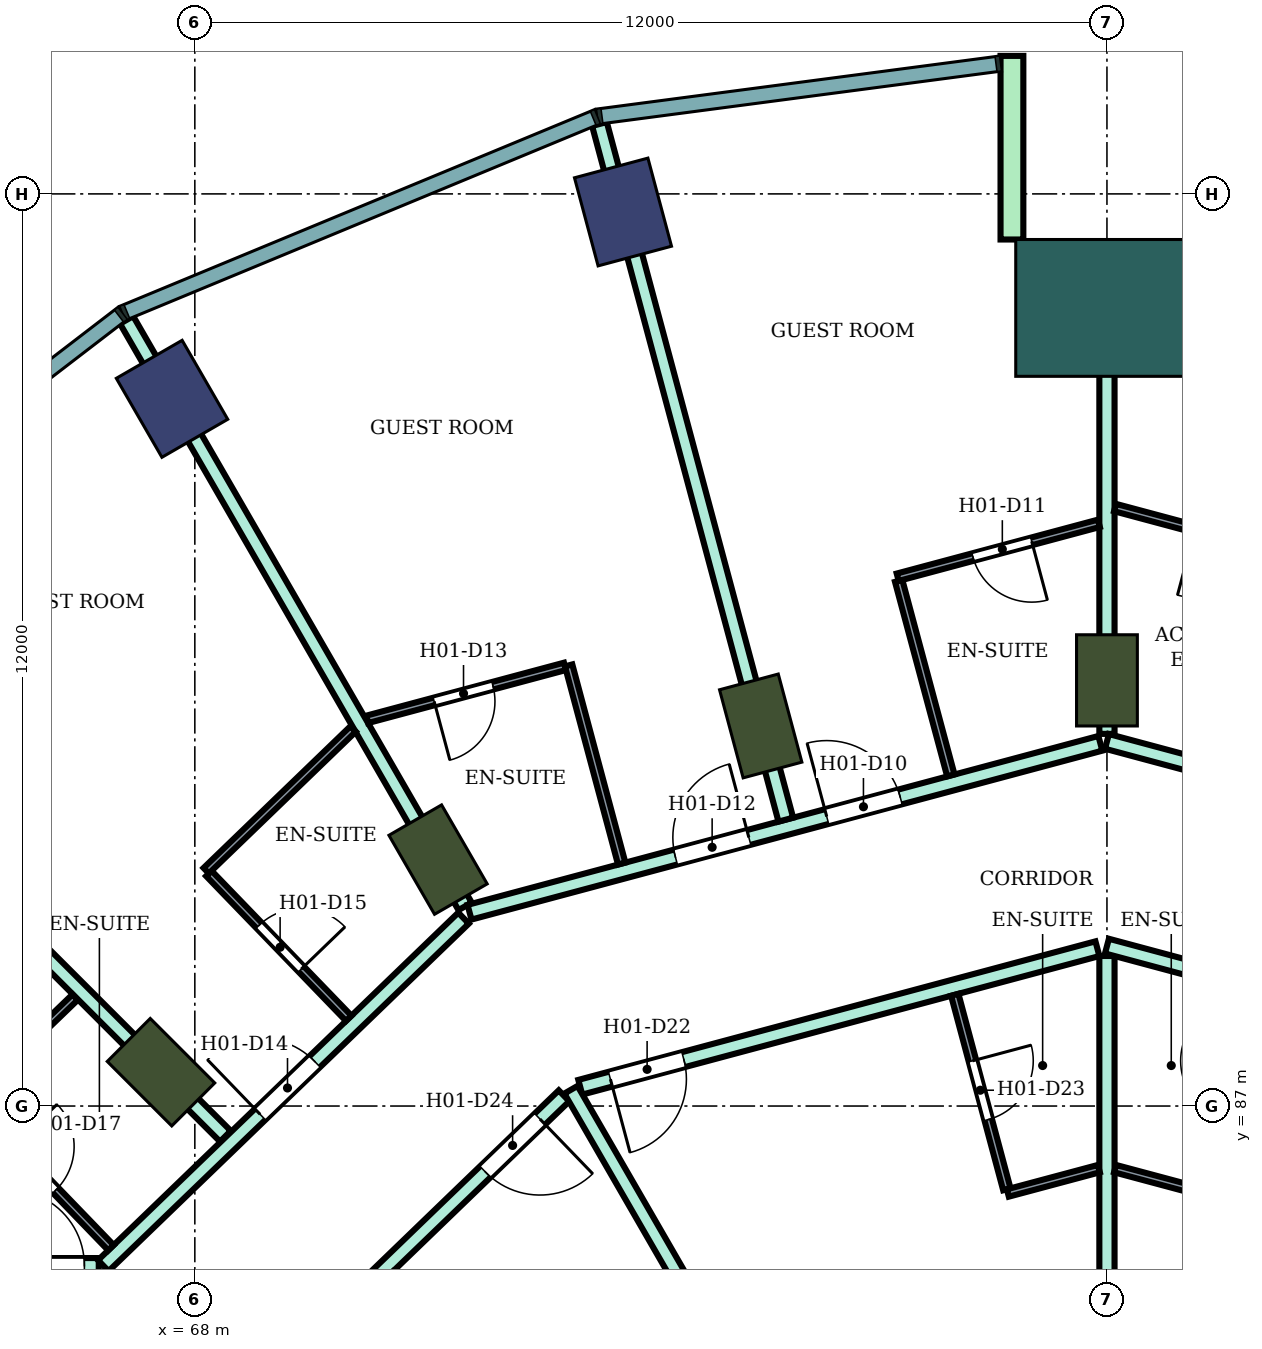
"""IFC4 building model, lengths in metres.
Left out: names, types, materials, properties, quantities, classifications, styles, units other than length and angle.
Written with IfcOpenShell. Run it as: python <this file> out.ifc"""

import sys

from ifc_helpers import new_model, si_unit, direction, frame, frame_2d, origin, origin_2d, place, context, subcontext, project, spatial, rectangle, extrude, element, fill, save


model = new_model("IFC4")
c1 = context("Model", 3, precision=1e-05, world=origin(), true_north=direction((0.0, 1.0)))
c2 = subcontext(c1, "Body", "Model", "MODEL_VIEW")
j1 = project(units=[si_unit("LENGTHUNIT", "METRE"), si_unit("PLANEANGLEUNIT", "RADIAN")], contexts=[c1])
p1 = place(None, origin())
s1 = spatial("IfcSite", under=j1, at=p1, CompositionType="ELEMENT")
p2 = place(p1, origin())
s2 = spatial("IfcBuilding", under=s1, at=p2, CompositionType="ELEMENT")
p3 = place(p2, frame((0.0, 0.0, 32.6)))
s3 = spatial("IfcBuildingStorey", under=s2, at=p3, CompositionType="ELEMENT", Elevation=32.6)
for number, where, z_axis, x_axis in (
    (1, (73.633, 98.762, 0.0), (0.0, 0.0, 1.0), (-0.259, 0.966, 0.0)),
    (2, (67.7, 96.304, 0.0), (0.0, 0.0, 1.0), (-0.5, 0.866, 0.0)),
):
    element("IfcColumn", number, at=place(p3, frame(where, z_axis=z_axis, x_axis=x_axis)), inside=s3, PredefinedType="COLUMN", context=c2, shape_type="SweptSolid", body=[
        extrude(rectangle(XDim=1.2, YDim=1.0, at=origin_2d()), origin(), (0.0, 0.0, 1.0), 3.8),
    ])
for number, where, z_axis, x_axis in (
    (3, (80.0, 92.6, 0.0), (0.0, 0.0, 1.0), (0.0, 1.0, 0.0)),
    (4, (75.445, 92.0, 0.0), (0.0, 0.0, 1.0), (-0.259, 0.966, 0.0)),
    (5, (71.2, 90.242, 0.0), (0.0, 0.0, 1.0), (-0.5, 0.866, 0.0)),
    (6, (67.555, 87.445, 0.0), (0.0, 0.0, 1.0), (-0.707, 0.707, 0.0)),
):
    element("IfcColumn", number, at=place(p3, frame(where, z_axis=z_axis, x_axis=x_axis)), inside=s3, PredefinedType="COLUMN", context=c2, shape_type="SweptSolid", body=[
        extrude(rectangle(XDim=1.2, YDim=0.8, at=origin_2d()), origin(), (0.0, 0.0, 1.0), 3.8),
    ])
p4 = place(p3, frame((80.0, 97.5, 0.0), z_axis=(0.0, 0.0, 1.0), x_axis=(0.0, 1.0, 0.0)))
e7 = element("IfcColumn", 7, at=p4, inside=s3, PredefinedType="COLUMN", context=c2, shape_type="SweptSolid", body=[
    extrude(rectangle(XDim=1.8, YDim=2.4, at=origin_2d()), origin(), (0.0, 0.0, 1.0), 3.8),
])
p5 = place(p3, frame((78.75, 98.4, 0.0), z_axis=(0.0, 0.0, 1.0), x_axis=(0.0, 1.0, 0.0)))
e8 = element("IfcWall", 8, at=p5, inside=s3, PredefinedType="NOTDEFINED", context=c2, shape_type="SweptSolid", body=[
    extrude(rectangle(XDim=2.416, YDim=0.3, at=frame_2d((1.208, 0.0))), origin(), (0.0, 0.0, 1.0), 3.8),
])
p6 = place(p3, frame((63.599, 91.408, 0.0), z_axis=(0.0, 0.0, 1.0), x_axis=(0.706981017422, -0.707232522587, 0.0)))
e9 = element("IfcWall", 9, at=p6, inside=s3, PredefinedType="PARTITIONING", context=c2, shape_type="SweptSolid", body=[
    extrude(rectangle(XDim=6.795, YDim=0.2, at=frame_2d((3.397, 0.0))), origin(), (0.0, 0.0, 1.0), 3.35),
])
p7 = place(p3, frame((65.2, 84.9, 0.0), z_axis=(0.0, 0.0, 1.0), x_axis=(1.0, 0.0, 0.0)))
e10 = element("IfcWall", 10, at=p7, inside=s3, PredefinedType="PARTITIONING", context=c2, shape_type="SweptSolid", body=[
    extrude(rectangle(XDim=1.536, YDim=0.2, at=frame_2d((0.768, 0.0))), origin(), (0.0, 0.0, 1.0), 3.35),
])
p8 = place(p7, frame((0.347, 0.0, 0.0)))
e11 = element("IfcOpeningElement", 11, at=p8, cuts=e10, PredefinedType="OPENING", context=c2, shape_type="SweptSolid", body=[
    extrude(rectangle(XDim=1.0, YDim=2.1, at=frame_2d((0.5, 1.05))), frame((0.0, 0.11, 0.0), z_axis=(0.0, -1.0, 0.0), x_axis=(1.0, 0.0, 0.0)), (0.0, 0.0, 1.0), 0.22),
])
p9 = place(p3, frame((66.796, 84.9, 0.0), z_axis=(0.0, 0.0, 1.0), x_axis=(0.719690131178, 0.694295409092, 0.0)))
e12 = element("IfcWall", 12, at=p9, inside=s3, PredefinedType="PARTITIONING", context=c2, shape_type="SweptSolid", body=[
    extrude(rectangle(XDim=6.585, YDim=0.2, at=frame_2d((3.293, 0.0))), origin(), (0.0, 0.0, 1.0), 3.35),
])
p10 = place(p9, frame((2.867, 0.0, 0.0)))
e13 = element("IfcOpeningElement", 13, at=p10, cuts=e12, PredefinedType="OPENING", context=c2, shape_type="SweptSolid", body=[
    extrude(rectangle(XDim=1.0, YDim=2.1, at=frame_2d((0.5, 1.05))), frame((0.0, 0.11, 0.0), z_axis=(0.0, -1.0, 0.0), x_axis=(1.0, 0.0, 0.0)), (0.0, 0.0, 1.0), 0.22),
])
p11 = place(p3, frame((67.102, 97.342, 0.0), z_axis=(0.0, 0.0, 1.0), x_axis=(0.499944680089, -0.866057340394, 0.0)))
e14 = element("IfcWall", 14, at=p11, inside=s3, PredefinedType="PARTITIONING", context=c2, shape_type="SweptSolid", body=[
    extrude(rectangle(XDim=8.908, YDim=0.2, at=frame_2d((4.454, 0.0))), origin(), (0.0, 0.0, 1.0), 3.35),
])
p12 = place(p3, frame((68.987, 83.4, 0.0), z_axis=(0.0, 0.0, 1.0), x_axis=(0.719591503389, 0.694397629784, 0.0)))
e15 = element("IfcWall", 15, at=p12, inside=s3, PredefinedType="PARTITIONING", context=c2, shape_type="SweptSolid", body=[
    extrude(rectangle(XDim=5.378, YDim=0.2, at=frame_2d((2.689, 0.0))), origin(), (0.0, 0.0, 1.0), 3.35),
])
p13 = place(p12, frame((3.938, 0.0, 0.0)))
e16 = element("IfcOpeningElement", 16, at=p13, cuts=e15, PredefinedType="OPENING", context=c2, shape_type="SweptSolid", body=[
    extrude(rectangle(XDim=1.0, YDim=2.1, at=frame_2d((0.5, 1.05))), frame((0.0, 0.11, 0.0), z_axis=(0.0, -1.0, 0.0), x_axis=(1.0, 0.0, 0.0)), (0.0, 0.0, 1.0), 0.22),
])
p14 = place(p3, frame((71.614, 89.55, 0.0), z_axis=(0.0, 0.0, 1.0), x_axis=(0.965982156828, 0.258608725086, 0.0)))
e17 = element("IfcWall", 17, at=p14, inside=s3, PredefinedType="PARTITIONING", context=c2, shape_type="SweptSolid", body=[
    extrude(rectangle(XDim=8.592, YDim=0.2, at=frame_2d((4.296, 0.0))), origin(), (0.0, 0.0, 1.0), 3.35),
])
p15 = place(p14, frame((4.865, 0.0, 0.0)))
e18 = element("IfcOpeningElement", 18, at=p15, cuts=e17, PredefinedType="OPENING", context=c2, shape_type="SweptSolid", body=[
    extrude(rectangle(XDim=1.0, YDim=2.1, at=frame_2d((0.5, 1.05))), frame((0.0, 0.11, 0.0), z_axis=(0.0, -1.0, 0.0), x_axis=(1.0, 0.0, 0.0)), (0.0, 0.0, 1.0), 0.22),
])
p16 = place(p14, frame((2.804, 0.0, 0.0)))
e19 = element("IfcOpeningElement", 19, at=p16, cuts=e17, PredefinedType="OPENING", context=c2, shape_type="SweptSolid", body=[
    extrude(rectangle(XDim=1.0, YDim=2.1, at=frame_2d((0.5, 1.05))), frame((0.0, 0.11, 0.0), z_axis=(0.0, -1.0, 0.0), x_axis=(1.0, 0.0, 0.0)), (0.0, 0.0, 1.0), 0.22),
])
p17 = place(p3, frame((73.071, 87.247, 0.0), z_axis=(0.0, 0.0, 1.0), x_axis=(0.965931651205, 0.258797305243, 0.0)))
e20 = element("IfcWall", 20, at=p17, inside=s3, PredefinedType="PARTITIONING", context=c2, shape_type="SweptSolid", body=[
    extrude(rectangle(XDim=7.043, YDim=0.2, at=frame_2d((3.521, 0.0))), origin(), (0.0, 0.0, 1.0), 3.35),
])
p18 = place(p17, frame((0.41, 0.0, 0.0)))
e21 = element("IfcOpeningElement", 21, at=p18, cuts=e20, PredefinedType="OPENING", context=c2, shape_type="SweptSolid", body=[
    extrude(rectangle(XDim=1.0, YDim=2.1, at=frame_2d((0.5, 1.05))), frame((0.0, 0.11, 0.0), z_axis=(0.0, -1.0, 0.0), x_axis=(1.0, 0.0, 0.0)), (0.0, 0.0, 1.0), 0.22),
])
p19 = place(p3, frame((72.948, 87.214, 0.0), z_axis=(0.0, 0.0, 1.0), x_axis=(0.499943524694, -0.866058007363, 0.0)))
e22 = element("IfcWall", 22, at=p19, inside=s3, PredefinedType="PARTITIONING", context=c2, shape_type="SweptSolid", body=[
    extrude(rectangle(XDim=6.405, YDim=0.2, at=frame_2d((3.203, 0.0))), origin(), (0.0, 0.0, 1.0), 3.35),
])
p20 = place(p3, frame((73.323, 99.919, 0.0), z_axis=(0.0, 0.0, 1.0), x_axis=(0.258817230439, -0.965926312525, 0.0)))
e23 = element("IfcWall", 23, at=p20, inside=s3, PredefinedType="PARTITIONING", context=c2, shape_type="SweptSolid", body=[
    extrude(rectangle(XDim=9.474, YDim=0.2, at=frame_2d((4.737, 0.0))), origin(), (0.0, 0.0, 1.0), 3.35),
])
p21 = place(p3, frame((80.0, 82.699, 0.0), z_axis=(0.0, 0.0, 1.0), x_axis=(0.0, 1.0, 0.0)))
e24 = element("IfcWall", 24, at=p21, inside=s3, PredefinedType="PARTITIONING", context=c2, shape_type="SweptSolid", body=[
    extrude(rectangle(XDim=6.275, YDim=0.2, at=frame_2d((3.138, 0.0))), origin(), (0.0, 0.0, 1.0), 3.35),
])
p22 = place(p3, frame((80.0, 89.104, 0.0), z_axis=(0.0, 0.0, 1.0), x_axis=(0.965856548257, -0.259077455964, 0.0)))
e25 = element("IfcWall", 25, at=p22, inside=s3, PredefinedType="PARTITIONING", context=c2, shape_type="SweptSolid", body=[
    extrude(rectangle(XDim=7.173, YDim=0.2, at=frame_2d((3.586, 0.0))), origin(), (0.0, 0.0, 1.0), 3.35),
])
p23 = place(p22, frame((5.763, 0.0, 0.0)))
e26 = element("IfcOpeningElement", 26, at=p23, cuts=e25, PredefinedType="OPENING", context=c2, shape_type="SweptSolid", body=[
    extrude(rectangle(XDim=1.0, YDim=2.1, at=frame_2d((0.5, 1.05))), frame((0.0, 0.11, 0.0), z_axis=(0.0, -1.0, 0.0), x_axis=(1.0, 0.0, 0.0)), (0.0, 0.0, 1.0), 0.22),
])
p24 = place(p3, frame((80.0, 91.896, 0.0), z_axis=(0.0, 0.0, 1.0), x_axis=(0.0, 1.0, 0.0)))
e27 = element("IfcWall", 27, at=p24, inside=s3, PredefinedType="PARTITIONING", context=c2, shape_type="SweptSolid", body=[
    extrude(rectangle(XDim=6.304, YDim=0.2, at=frame_2d((3.152, 0.0))), origin(), (0.0, 0.0, 1.0), 3.35),
])
p25 = place(p3, frame((80.0, 91.797, 0.0), z_axis=(0.0, 0.0, 1.0), x_axis=(0.965857042792, -0.259075612301, 0.0)))
e28 = element("IfcWall", 28, at=p25, inside=s3, PredefinedType="PARTITIONING", context=c2, shape_type="SweptSolid", body=[
    extrude(rectangle(XDim=8.602, YDim=0.2, at=frame_2d((4.301, 0.0))), origin(), (0.0, 0.0, 1.0), 3.35),
])
p26 = place(p25, frame((4.877, 0.0, 0.0)))
e29 = element("IfcOpeningElement", 29, at=p26, cuts=e28, PredefinedType="OPENING", context=c2, shape_type="SweptSolid", body=[
    extrude(rectangle(XDim=1.0, YDim=2.1, at=frame_2d((0.5, 1.05))), frame((0.0, 0.11, 0.0), z_axis=(0.0, -1.0, 0.0), x_axis=(1.0, 0.0, 0.0)), (0.0, 0.0, 1.0), 0.22),
])
p27 = place(p25, frame((2.73, 0.0, 0.0)))
e30 = element("IfcOpeningElement", 30, at=p27, cuts=e28, PredefinedType="OPENING", context=c2, shape_type="SweptSolid", body=[
    extrude(rectangle(XDim=1.1, YDim=2.1, at=frame_2d((0.55, 1.05))), frame((0.0, 0.11, 0.0), z_axis=(0.0, -1.0, 0.0), x_axis=(1.0, 0.0, 0.0)), (0.0, 0.0, 1.0), 0.22),
])
p28 = place(p3, frame((65.058, 87.114, 0.0), z_axis=(0.0, 0.0, 1.0), x_axis=(0.719715847356, 0.694268751324, 0.0)))
e31 = element("IfcWall", 31, at=p28, inside=s3, PredefinedType="PARTITIONING", context=c2, shape_type="SweptSolid", body=[
    extrude(rectangle(XDim=1.9, YDim=0.1, at=frame_2d((0.95, 0.0))), origin(), (0.0, 0.0, 1.0), 3.35),
])
p29 = place(p3, frame((65.022, 87.079, 0.0), z_axis=(0.0, 0.0, 1.0), x_axis=(0.694287838235, -0.719697434815, 0.0)))
e32 = element("IfcWall", 32, at=p29, inside=s3, PredefinedType="PARTITIONING", context=c2, shape_type="SweptSolid", body=[
    extrude(rectangle(XDim=2.7, YDim=0.1, at=frame_2d((1.35, 0.0))), origin(), (0.0, 0.0, 1.0), 3.35),
])
p30 = place(p29, frame((0.85, 0.0, 0.0)))
e33 = element("IfcOpeningElement", 33, at=p30, cuts=e32, PredefinedType="OPENING", context=c2, shape_type="SweptSolid", body=[
    extrude(rectangle(XDim=0.8, YDim=2.1, at=frame_2d((0.4, 1.05))), frame((0.0, 0.06, 0.0), z_axis=(0.0, -1.0, 0.0), x_axis=(1.0, 0.0, 0.0)), (0.0, 0.0, 1.0), 0.12),
])
p31 = place(p3, frame((68.185, 90.06, 0.0), z_axis=(0.0, 0.0, 1.0), x_axis=(0.69446127412, -0.719530081892, 0.0)))
e34 = element("IfcWall", 34, at=p31, inside=s3, PredefinedType="PARTITIONING", context=c2, shape_type="SweptSolid", body=[
    extrude(rectangle(XDim=2.649, YDim=0.1, at=frame_2d((1.324, 0.0))), origin(), (0.0, 0.0, 1.0), 3.35),
])
p32 = place(p31, frame((0.95, 0.0, 0.0)))
e35 = element("IfcOpeningElement", 35, at=p32, cuts=e34, PredefinedType="OPENING", context=c2, shape_type="SweptSolid", body=[
    extrude(rectangle(XDim=0.8, YDim=2.1, at=frame_2d((0.4, 1.05))), frame((0.0, 0.06, 0.0), z_axis=(0.0, -1.0, 0.0), x_axis=(1.0, 0.0, 0.0)), (0.0, 0.0, 1.0), 0.12),
])
p33 = place(p3, frame((68.15, 90.096, 0.0), z_axis=(0.0, 0.0, 1.0), x_axis=(0.719669144226, 0.694317163009, 0.0)))
e36 = element("IfcWall", 36, at=p33, inside=s3, PredefinedType="PARTITIONING", context=c2, shape_type="SweptSolid", body=[
    extrude(rectangle(XDim=2.687, YDim=0.1, at=frame_2d((1.343, 0.0))), origin(), (0.0, 0.0, 1.0), 3.35),
])
p34 = place(p3, frame((70.268, 92.087, 0.0), z_axis=(0.0, 0.0, 1.0), x_axis=(0.965931867509, 0.258796497911, 0.0)))
e37 = element("IfcWall", 37, at=p34, inside=s3, PredefinedType="PARTITIONING", context=c2, shape_type="SweptSolid", body=[
    extrude(rectangle(XDim=2.693, YDim=0.1, at=frame_2d((1.347, 0.0))), origin(), (0.0, 0.0, 1.0), 3.35),
])
p35 = place(p34, frame((0.912, 0.0, 0.0)))
e38 = element("IfcOpeningElement", 38, at=p35, cuts=e37, PredefinedType="OPENING", context=c2, shape_type="SweptSolid", body=[
    extrude(rectangle(XDim=0.8, YDim=2.1, at=frame_2d((0.4, 1.05))), frame((0.0, 0.06, 0.0), z_axis=(0.0, -1.0, 0.0), x_axis=(1.0, 0.0, 0.0)), (0.0, 0.0, 1.0), 0.12),
])
p36 = place(p3, frame((72.918, 92.797, 0.0), z_axis=(0.0, 0.0, 1.0), x_axis=(0.25867580527, -0.965964195904, 0.0)))
e39 = element("IfcWall", 39, at=p36, inside=s3, PredefinedType="PARTITIONING", context=c2, shape_type="SweptSolid", body=[
    extrude(rectangle(XDim=2.699, YDim=0.1, at=frame_2d((1.35, 0.0))), origin(), (0.0, 0.0, 1.0), 3.35),
])
p37 = place(p3, frame((77.26, 93.909, 0.0), z_axis=(0.0, 0.0, 1.0), x_axis=(0.258935674139, -0.965894568086, 0.0)))
e40 = element("IfcWall", 40, at=p37, inside=s3, PredefinedType="PARTITIONING", context=c2, shape_type="SweptSolid", body=[
    extrude(rectangle(XDim=2.649, YDim=0.1, at=frame_2d((1.325, 0.0))), origin(), (0.0, 0.0, 1.0), 3.35),
])
p38 = place(p3, frame((77.247, 93.957, 0.0), z_axis=(0.0, 0.0, 1.0), x_axis=(0.965922199757, 0.258832579125, 0.0)))
e41 = element("IfcWall", 41, at=p38, inside=s3, PredefinedType="PARTITIONING", context=c2, shape_type="SweptSolid", body=[
    extrude(rectangle(XDim=2.74, YDim=0.1, at=frame_2d((1.37, 0.0))), origin(), (0.0, 0.0, 1.0), 3.35),
])
p39 = place(p38, frame((1.025, 0.0, 0.0)))
e42 = element("IfcOpeningElement", 42, at=p39, cuts=e41, PredefinedType="OPENING", context=c2, shape_type="SweptSolid", body=[
    extrude(rectangle(XDim=0.8, YDim=2.1, at=frame_2d((0.4, 1.05))), frame((0.0, 0.06, 0.0), z_axis=(0.0, -1.0, 0.0), x_axis=(1.0, 0.0, 0.0)), (0.0, 0.0, 1.0), 0.12),
])
p40 = place(p3, frame((77.998, 88.463, 0.0), z_axis=(0.0, 0.0, 1.0), x_axis=(0.258677737588, -0.965963678446, 0.0)))
e43 = element("IfcWall", 43, at=p40, inside=s3, PredefinedType="PARTITIONING", context=c2, shape_type="SweptSolid", body=[
    extrude(rectangle(XDim=2.649, YDim=0.1, at=frame_2d((1.325, 0.0))), origin(), (0.0, 0.0, 1.0), 3.35),
])
p41 = place(p40, frame((0.9, 0.0, 0.0)))
e44 = element("IfcOpeningElement", 44, at=p41, cuts=e43, PredefinedType="OPENING", context=c2, shape_type="SweptSolid", body=[
    extrude(rectangle(XDim=0.8, YDim=2.1, at=frame_2d((0.4, 1.05))), frame((0.0, 0.06, 0.0), z_axis=(0.0, -1.0, 0.0), x_axis=(1.0, 0.0, 0.0)), (0.0, 0.0, 1.0), 0.12),
])
p42 = place(p3, frame((78.696, 85.856, 0.0), z_axis=(0.0, 0.0, 1.0), x_axis=(0.966002513606, 0.258532674351, 0.0)))
e45 = element("IfcWall", 45, at=p42, inside=s3, PredefinedType="PARTITIONING", context=c2, shape_type="SweptSolid", body=[
    extrude(rectangle(XDim=1.24, YDim=0.1, at=frame_2d((0.62, 0.0))), origin(), (0.0, 0.0, 1.0), 3.35),
])
p43 = place(p3, frame((80.106, 86.177, 0.0), z_axis=(0.0, 0.0, 1.0), x_axis=(0.966002973184, -0.258530957139, 0.0)))
e46 = element("IfcWall", 46, at=p43, inside=s3, PredefinedType="PARTITIONING", context=c2, shape_type="SweptSolid", body=[
    extrude(rectangle(XDim=1.19, YDim=0.1, at=frame_2d((0.595, 0.0))), origin(), (0.0, 0.0, 1.0), 3.35),
])
p44 = place(p3, frame((80.106, 94.874, 0.0), z_axis=(0.0, 0.0, 1.0), x_axis=(0.965915808883, -0.258856427676, 0.0)))
e47 = element("IfcWall", 47, at=p44, inside=s3, PredefinedType="PARTITIONING", context=c2, shape_type="SweptSolid", body=[
    extrude(rectangle(XDim=3.144, YDim=0.1, at=frame_2d((1.572, 0.0))), origin(), (0.0, 0.0, 1.0), 3.35),
])
p45 = place(p44, frame((1.092, 0.0, 0.0)))
e48 = element("IfcOpeningElement", 48, at=p45, cuts=e47, PredefinedType="OPENING", context=c2, shape_type="SweptSolid", body=[
    extrude(rectangle(XDim=0.9, YDim=2.1, at=frame_2d((0.45, 1.05))), frame((0.0, 0.06, 0.0), z_axis=(0.0, -1.0, 0.0), x_axis=(1.0, 0.0, 0.0)), (0.0, 0.0, 1.0), 0.12),
])
p46 = place(p15, origin())
e49 = element("IfcDoor", 49, at=p46, inside=s3, OperationType="SINGLE_SWING_LEFT", PredefinedType="DOOR", context=c2, shape_type="SweptSolid", body=[
    extrude(rectangle(XDim=1.0, YDim=2.1, at=frame_2d((0.5, 1.05))), frame((0.0, 0.025, 0.0), z_axis=(0.0, -1.0, 0.0), x_axis=(1.0, 0.0, 0.0)), (0.0, 0.0, 1.0), 0.05),
])
fill(e18, e49)
p47 = place(p39, frame((0.8, 0.0, 0.0), z_axis=(0.0, 0.0, 1.0), x_axis=(-1.0, 0.0, 0.0)))
e50 = element("IfcDoor", 50, at=p47, inside=s3, OperationType="SINGLE_SWING_LEFT", PredefinedType="DOOR", context=c2, shape_type="SweptSolid", body=[
    extrude(rectangle(XDim=0.8, YDim=2.1, at=frame_2d((0.4, 1.05))), frame((0.0, 0.025, 0.0), z_axis=(0.0, -1.0, 0.0), x_axis=(1.0, 0.0, 0.0)), (0.0, 0.0, 1.0), 0.05),
])
fill(e42, e50)
p48 = place(p16, origin())
e51 = element("IfcDoor", 51, at=p48, inside=s3, OperationType="SINGLE_SWING_RIGHT", PredefinedType="DOOR", context=c2, shape_type="SweptSolid", body=[
    extrude(rectangle(XDim=1.0, YDim=2.1, at=frame_2d((0.5, 1.05))), frame((0.0, 0.025, 0.0), z_axis=(0.0, -1.0, 0.0), x_axis=(1.0, 0.0, 0.0)), (0.0, 0.0, 1.0), 0.05),
])
fill(e19, e51)
p49 = place(p35, frame((0.8, 0.0, 0.0), z_axis=(0.0, 0.0, 1.0), x_axis=(-1.0, 0.0, 0.0)))
e52 = element("IfcDoor", 52, at=p49, inside=s3, OperationType="SINGLE_SWING_RIGHT", PredefinedType="DOOR", context=c2, shape_type="SweptSolid", body=[
    extrude(rectangle(XDim=0.8, YDim=2.1, at=frame_2d((0.4, 1.05))), frame((0.0, 0.025, 0.0), z_axis=(0.0, -1.0, 0.0), x_axis=(1.0, 0.0, 0.0)), (0.0, 0.0, 1.0), 0.05),
])
fill(e38, e52)
p50 = place(p10, origin())
e53 = element("IfcDoor", 53, at=p50, inside=s3, OperationType="SINGLE_SWING_LEFT", PredefinedType="DOOR", context=c2, shape_type="SweptSolid", body=[
    extrude(rectangle(XDim=1.0, YDim=2.1, at=frame_2d((0.5, 1.05))), frame((0.0, 0.025, 0.0), z_axis=(0.0, -1.0, 0.0), x_axis=(1.0, 0.0, 0.0)), (0.0, 0.0, 1.0), 0.05),
])
fill(e13, e53)
p51 = place(p32, origin())
e54 = element("IfcDoor", 54, at=p51, inside=s3, OperationType="SINGLE_SWING_RIGHT", PredefinedType="DOOR", context=c2, shape_type="SweptSolid", body=[
    extrude(rectangle(XDim=0.8, YDim=2.1, at=frame_2d((0.4, 1.05))), frame((0.0, 0.025, 0.0), z_axis=(0.0, -1.0, 0.0), x_axis=(1.0, 0.0, 0.0)), (0.0, 0.0, 1.0), 0.05),
])
fill(e35, e54)
p52 = place(p8, origin())
e55 = element("IfcDoor", 55, at=p52, inside=s3, OperationType="SINGLE_SWING_LEFT", PredefinedType="DOOR", context=c2, shape_type="SweptSolid", body=[
    extrude(rectangle(XDim=1.0, YDim=2.1, at=frame_2d((0.5, 1.05))), frame((0.0, 0.025, 0.0), z_axis=(0.0, -1.0, 0.0), x_axis=(1.0, 0.0, 0.0)), (0.0, 0.0, 1.0), 0.05),
])
fill(e11, e55)
p53 = place(p30, origin())
e56 = element("IfcDoor", 56, at=p53, inside=s3, OperationType="SINGLE_SWING_LEFT", PredefinedType="DOOR", context=c2, shape_type="SweptSolid", body=[
    extrude(rectangle(XDim=0.8, YDim=2.1, at=frame_2d((0.4, 1.05))), frame((0.0, 0.025, 0.0), z_axis=(0.0, -1.0, 0.0), x_axis=(1.0, 0.0, 0.0)), (0.0, 0.0, 1.0), 0.05),
])
fill(e33, e56)
p54 = place(p18, frame((1.0, 0.0, 0.0), z_axis=(0.0, 0.0, 1.0), x_axis=(-1.0, 0.0, 0.0)))
e57 = element("IfcDoor", 57, at=p54, inside=s3, OperationType="SINGLE_SWING_RIGHT", PredefinedType="DOOR", context=c2, shape_type="SweptSolid", body=[
    extrude(rectangle(XDim=1.0, YDim=2.1, at=frame_2d((0.5, 1.05))), frame((0.0, 0.025, 0.0), z_axis=(0.0, -1.0, 0.0), x_axis=(1.0, 0.0, 0.0)), (0.0, 0.0, 1.0), 0.05),
])
fill(e21, e57)
p55 = place(p41, origin())
e58 = element("IfcDoor", 58, at=p55, inside=s3, OperationType="SINGLE_SWING_LEFT", PredefinedType="DOOR", context=c2, shape_type="SweptSolid", body=[
    extrude(rectangle(XDim=0.8, YDim=2.1, at=frame_2d((0.4, 1.05))), frame((0.0, 0.025, 0.0), z_axis=(0.0, -1.0, 0.0), x_axis=(1.0, 0.0, 0.0)), (0.0, 0.0, 1.0), 0.05),
])
fill(e44, e58)
p56 = place(p13, frame((1.0, 0.0, 0.0), z_axis=(0.0, 0.0, 1.0), x_axis=(-1.0, 0.0, 0.0)))
e59 = element("IfcDoor", 59, at=p56, inside=s3, OperationType="SINGLE_SWING_LEFT", PredefinedType="DOOR", context=c2, shape_type="SweptSolid", body=[
    extrude(rectangle(XDim=1.0, YDim=2.1, at=frame_2d((0.5, 1.05))), frame((0.0, 0.025, 0.0), z_axis=(0.0, -1.0, 0.0), x_axis=(1.0, 0.0, 0.0)), (0.0, 0.0, 1.0), 0.05),
])
fill(e16, e59)
save(model, sys.argv[1])
